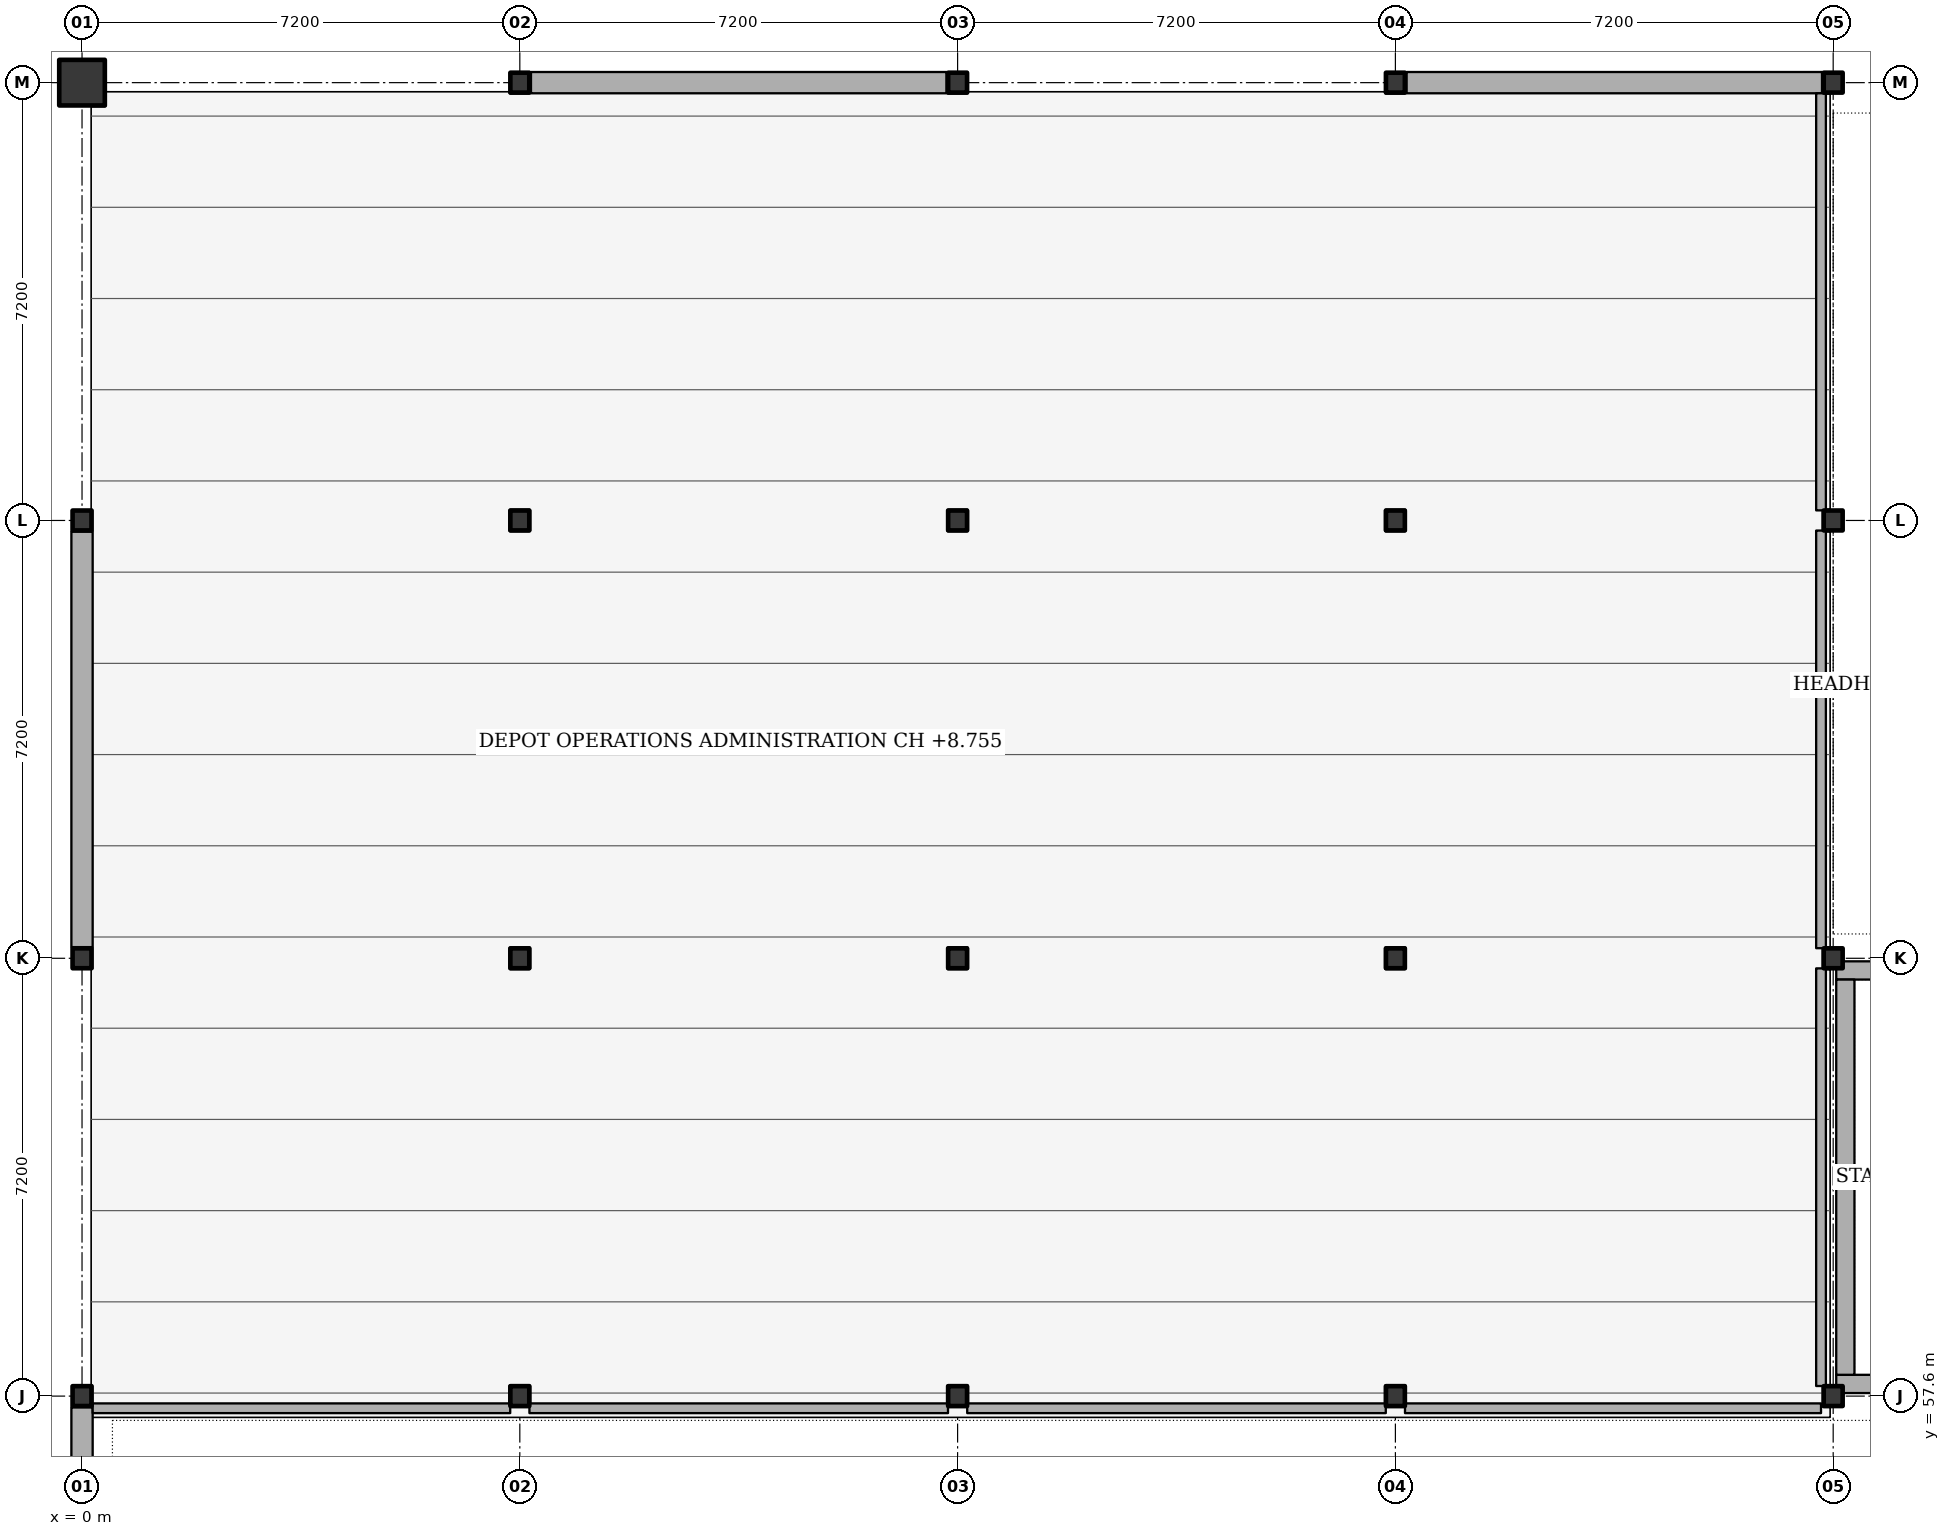
"""IFC4 building model, lengths in metres.
Left out: names, types, materials, properties, quantities, classifications, styles, units other than length and angle.
Written with IfcOpenShell. Run it as: python <this file> out.ifc"""

import sys

from ifc_helpers import new_model, si_unit, direction, frame, frame_2d, origin, origin_2d, place, context, subcontext, project, spatial, rectangle, i_section, extrude, element, fill, save


model = new_model("IFC4")
c1 = context("Model", 3, precision=1e-05, world=origin(), true_north=direction((0.0, 1.0)))
c2 = subcontext(c1, "Body", "Model", "MODEL_VIEW")
j1 = project(units=[si_unit("LENGTHUNIT", "METRE"), si_unit("PLANEANGLEUNIT", "RADIAN")], contexts=[c1])
p1 = place(None, origin())
s1 = spatial("IfcSite", under=j1, at=p1, CompositionType="ELEMENT")
p2 = place(p1, origin())
s2 = spatial("IfcBuilding", under=s1, at=p2, CompositionType="ELEMENT")
p3 = place(p2, frame((0.0, 0.0, 5.4)))
s3 = spatial("IfcBuildingStorey", under=s2, at=p3, CompositionType="ELEMENT", Elevation=5.4)
for number, where, z_axis, x_axis in (
    (1, (0.0, 57.6, 0.0), (0.0, 0.0, 1.0), (1.0, 0.0, 0.0)),
    (2, (0.0, 64.8, 0.0), (0.0, 0.0, 1.0), (1.0, 0.0, 0.0)),
    (3, (0.0, 72.0, 0.0), (0.0, 0.0, 1.0), (1.0, 0.0, 0.0)),
):
    element("IfcColumn", number, at=place(p3, frame(where, z_axis=z_axis, x_axis=x_axis)), inside=s3, PredefinedType="COLUMN", context=c2, shape_type="SweptSolid", body=[
        extrude(i_section(OverallWidth=0.311, OverallDepth=0.327, WebThickness=0.016, FlangeThickness=0.025, FilletRadius=0.015, at=origin_2d()), origin(), (0.0, 0.0, 1.0), 4.5),
    ])
p4 = place(p3, frame((0.0, 79.2, 0.0), z_axis=(0.0, 0.0, 1.0), x_axis=(1.0, 0.0, 0.0)))
e4 = element("IfcColumn", 4, at=p4, inside=s3, PredefinedType="COLUMN", context=c2, shape_type="SweptSolid", body=[
    extrude(rectangle(XDim=0.75, YDim=0.75, at=origin_2d()), origin(), (0.0, 0.0, 1.0), 4.5),
])
for number, where, z_axis, x_axis in (
    (5, (7.2, 57.6, 0.0), (0.0, 0.0, 1.0), (1.0, 0.0, 0.0)),
    (6, (7.2, 64.8, 0.0), (0.0, 0.0, 1.0), (1.0, 0.0, 0.0)),
    (7, (7.2, 72.0, 0.0), (0.0, 0.0, 1.0), (1.0, 0.0, 0.0)),
    (8, (7.2, 79.2, 0.0), (0.0, 0.0, 1.0), (1.0, 0.0, 0.0)),
    (9, (14.4, 57.6, 0.0), (0.0, 0.0, 1.0), (1.0, 0.0, 0.0)),
    (10, (14.4, 64.8, 0.0), (0.0, 0.0, 1.0), (1.0, 0.0, 0.0)),
    (11, (14.4, 72.0, 0.0), (0.0, 0.0, 1.0), (1.0, 0.0, 0.0)),
    (12, (14.4, 79.2, 0.0), (0.0, 0.0, 1.0), (1.0, 0.0, 0.0)),
    (13, (21.6, 57.6, 0.0), (0.0, 0.0, 1.0), (1.0, 0.0, 0.0)),
    (14, (21.6, 64.8, 0.0), (0.0, 0.0, 1.0), (1.0, 0.0, 0.0)),
    (15, (21.6, 72.0, 0.0), (0.0, 0.0, 1.0), (1.0, 0.0, 0.0)),
    (16, (21.6, 79.2, 0.0), (0.0, 0.0, 1.0), (1.0, 0.0, 0.0)),
    (17, (28.8, 57.6, 0.0), (0.0, 0.0, 1.0), (1.0, 0.0, 0.0)),
    (18, (28.8, 64.8, 0.0), (0.0, 0.0, 1.0), (1.0, 0.0, 0.0)),
    (19, (28.8, 72.0, 0.0), (0.0, 0.0, 1.0), (1.0, 0.0, 0.0)),
    (20, (28.8, 79.2, 0.0), (0.0, 0.0, 1.0), (1.0, 0.0, 0.0)),
):
    element("IfcColumn", number, at=place(p3, frame(where, z_axis=z_axis, x_axis=x_axis)), inside=s3, PredefinedType="COLUMN", context=c2, shape_type="SweptSolid", body=[
        extrude(i_section(OverallWidth=0.311, OverallDepth=0.327, WebThickness=0.016, FlangeThickness=0.025, FilletRadius=0.015, at=origin_2d()), origin(), (0.0, 0.0, 1.0), 4.5),
    ])
p5 = place(p3, frame((0.0, 50.583, 0.0), z_axis=(0.0, 0.0, 1.0), x_axis=(0.0, 1.0, 0.0)))
e21 = element("IfcWall", 21, at=p5, inside=s3, PredefinedType="SOLIDWALL", context=c2, shape_type="SweptSolid", body=[
    extrude(rectangle(XDim=6.833, YDim=0.35, at=frame_2d((3.417, 0.0))), origin(), (0.0, 0.0, 1.0), 3.704),
])
p6 = place(p5, frame((0.783, 0.0, 1.05)))
e22 = element("IfcOpeningElement", 22, at=p6, cuts=e21, PredefinedType="OPENING", context=c2, shape_type="SweptSolid", body=[
    extrude(rectangle(XDim=2.4, YDim=1.8, at=frame_2d((1.2, 0.9))), frame((0.0, 0.185, 0.0), z_axis=(0.0, -1.0, 0.0), x_axis=(1.0, 0.0, 0.0)), (0.0, 0.0, 1.0), 0.37),
])
p7 = place(p3, frame((0.0, 64.983, 0.0), z_axis=(0.0, 0.0, 1.0), x_axis=(0.0, 1.0, 0.0)))
e23 = element("IfcWall", 23, at=p7, inside=s3, PredefinedType="SOLIDWALL", context=c2, shape_type="SweptSolid", body=[
    extrude(rectangle(XDim=6.833, YDim=0.35, at=frame_2d((3.417, 0.0))), origin(), (0.0, 0.0, 1.0), 3.704),
])
p8 = place(p7, frame((2.916, 0.0, 1.05)))
e24 = element("IfcOpeningElement", 24, at=p8, cuts=e23, PredefinedType="OPENING", context=c2, shape_type="SweptSolid", body=[
    extrude(rectangle(XDim=1.0, YDim=1.6, at=frame_2d((0.5, 0.8))), frame((0.0, 0.185, 0.0), z_axis=(0.0, -1.0, 0.0), x_axis=(1.0, 0.0, 0.0)), (0.0, 0.0, 1.0), 0.37),
])
p9 = place(p3, frame((7.384, 79.2, 0.0), z_axis=(0.0, 0.0, 1.0), x_axis=(1.0, 0.0, 0.0)))
e25 = element("IfcWall", 25, at=p9, inside=s3, PredefinedType="SOLIDWALL", context=c2, shape_type="SweptSolid", body=[
    extrude(rectangle(XDim=6.833, YDim=0.35, at=frame_2d((3.417, 0.0))), origin(), (0.0, 0.0, 1.0), 3.389),
])
p10 = place(p9, frame((2.916, 0.0, 1.05)))
e26 = element("IfcOpeningElement", 26, at=p10, cuts=e25, PredefinedType="OPENING", context=c2, shape_type="SweptSolid", body=[
    extrude(rectangle(XDim=1.0, YDim=1.6, at=frame_2d((0.5, 0.8))), frame((0.0, 0.185, 0.0), z_axis=(0.0, -1.0, 0.0), x_axis=(1.0, 0.0, 0.0)), (0.0, 0.0, 1.0), 0.37),
])
p11 = place(p3, frame((21.784, 79.2, 0.0), z_axis=(0.0, 0.0, 1.0), x_axis=(1.0, 0.0, 0.0)))
e27 = element("IfcWall", 27, at=p11, inside=s3, PredefinedType="SOLIDWALL", context=c2, shape_type="SweptSolid", body=[
    extrude(rectangle(XDim=6.833, YDim=0.35, at=frame_2d((3.417, 0.0))), origin(), (0.0, 0.0, 1.0), 3.478),
])
p12 = place(p11, frame((2.541, 0.0, 1.05)))
e28 = element("IfcOpeningElement", 28, at=p12, cuts=e27, PredefinedType="OPENING", context=c2, shape_type="SweptSolid", body=[
    extrude(rectangle(XDim=1.75, YDim=1.85, at=frame_2d((0.875, 0.925))), frame((0.0, 0.185, 0.0), z_axis=(0.0, -1.0, 0.0), x_axis=(1.0, 0.0, 0.0)), (0.0, 0.0, 1.0), 0.37),
])
p13 = place(p3, frame((28.85, 57.8, 0.0), z_axis=(0.0, 0.0, 1.0), x_axis=(1.0, 0.0, 0.0)))
e29 = element("IfcWall", 29, at=p13, inside=s3, PredefinedType="SHEAR", context=c2, shape_type="SweptSolid", body=[
    extrude(rectangle(XDim=14.35, YDim=0.3, at=frame_2d((7.175, 0.0))), origin(), (0.0, 0.0, 1.0), 3.55),
])
p14 = place(p13, frame((11.5, 0.0, 0.0)))
e30 = element("IfcOpeningElement", 30, at=p14, cuts=e29, PredefinedType="OPENING", context=c2, shape_type="SweptSolid", body=[
    extrude(rectangle(XDim=1.5, YDim=2.15, at=frame_2d((0.75, 1.075))), frame((0.0, 0.16, 0.0), z_axis=(0.0, -1.0, 0.0), x_axis=(1.0, 0.0, 0.0)), (0.0, 0.0, 1.0), 0.32),
])
p15 = place(p3, frame((28.85, 64.6, 0.0), z_axis=(0.0, 0.0, 1.0), x_axis=(1.0, 0.0, 0.0)))
e31 = element("IfcWall", 31, at=p15, inside=s3, PredefinedType="SHEAR", context=c2, shape_type="SweptSolid", body=[
    extrude(rectangle(XDim=14.35, YDim=0.3, at=frame_2d((7.175, 0.0))), origin(), (0.0, 0.0, 1.0), 3.55),
])
p16 = place(p3, frame((29.0, 57.95, 0.0), z_axis=(0.0, 0.0, 1.0), x_axis=(0.0, 1.0, 0.0)))
e32 = element("IfcWall", 32, at=p16, inside=s3, PredefinedType="SHEAR", context=c2, shape_type="SweptSolid", body=[
    extrude(rectangle(XDim=6.5, YDim=0.3, at=frame_2d((3.25, 0.0))), origin(), (0.0, 0.0, 1.0), 3.55),
])
p17 = place(p3, frame((0.175, 57.4, 0.0), z_axis=(0.0, 0.0, 1.0), x_axis=(1.0, 0.0, 0.0)))
e33 = element("IfcWall", 33, at=p17, inside=s3, PredefinedType="PARTITIONING", context=c2, shape_type="SweptSolid", body=[
    extrude(rectangle(XDim=6.867, YDim=0.16, at=frame_2d((3.434, 0.0))), origin(), (0.0, 0.0, 1.0), 3.55),
])
p18 = place(p3, frame((7.358, 57.4, 0.0), z_axis=(0.0, 0.0, 1.0), x_axis=(1.0, 0.0, 0.0)))
e34 = element("IfcWall", 34, at=p18, inside=s3, PredefinedType="PARTITIONING", context=c2, shape_type="SweptSolid", body=[
    extrude(rectangle(XDim=6.884, YDim=0.16, at=frame_2d((3.442, 0.0))), origin(), (0.0, 0.0, 1.0), 3.55),
])
p19 = place(p18, frame((2.957, 0.0, 0.0)))
e35 = element("IfcOpeningElement", 35, at=p19, cuts=e34, PredefinedType="OPENING", context=c2, shape_type="SweptSolid", body=[
    extrude(rectangle(XDim=0.97, YDim=2.12, at=frame_2d((0.485, 1.06))), frame((0.0, 0.09, 0.0), z_axis=(0.0, -1.0, 0.0), x_axis=(1.0, 0.0, 0.0)), (0.0, 0.0, 1.0), 0.18),
])
p20 = place(p3, frame((14.558, 57.4, 0.0), z_axis=(0.0, 0.0, 1.0), x_axis=(1.0, 0.0, 0.0)))
e36 = element("IfcWall", 36, at=p20, inside=s3, PredefinedType="PARTITIONING", context=c2, shape_type="SweptSolid", body=[
    extrude(rectangle(XDim=6.884, YDim=0.16, at=frame_2d((3.442, 0.0))), origin(), (0.0, 0.0, 1.0), 3.55),
])
p21 = place(p3, frame((21.758, 57.4, 0.0), z_axis=(0.0, 0.0, 1.0), x_axis=(1.0, 0.0, 0.0)))
e37 = element("IfcWall", 37, at=p21, inside=s3, PredefinedType="PARTITIONING", context=c2, shape_type="SweptSolid", body=[
    extrude(rectangle(XDim=6.842, YDim=0.16, at=frame_2d((3.421, 0.0))), origin(), (0.0, 0.0, 1.0), 3.55),
])
for number, where, z_axis, x_axis in (
    (38, (28.6, 57.766, 0.0), (0.0, 0.0, 1.0), (0.0, 1.0, 0.0)),
    (39, (28.6, 64.966, 0.0), (0.0, 0.0, 1.0), (0.0, 1.0, 0.0)),
):
    element("IfcWall", number, at=place(p3, frame(where, z_axis=z_axis, x_axis=x_axis)), inside=s3, PredefinedType="PARTITIONING", context=c2, shape_type="SweptSolid", body=[
        extrude(rectangle(XDim=6.868, YDim=0.16, at=frame_2d((3.434, 0.0))), origin(), (0.0, 0.0, 1.0), 3.55),
    ])
p22 = place(p3, frame((28.6, 72.166, 0.0), z_axis=(0.0, 0.0, 1.0), x_axis=(0.0, 1.0, 0.0)))
e40 = element("IfcWall", 40, at=p22, inside=s3, PredefinedType="PARTITIONING", context=c2, shape_type="SweptSolid", body=[
    extrude(rectangle(XDim=6.859, YDim=0.16, at=frame_2d((3.429, 0.0))), origin(), (0.0, 0.0, 1.0), 3.55),
])
p23 = place(p8, origin())
e41 = element("IfcWindow", 41, at=p23, inside=s3, PartitioningType="SINGLE_PANEL", PredefinedType="WINDOW", context=c2, shape_type="SweptSolid", body=[
    extrude(rectangle(XDim=1.0, YDim=1.6, at=frame_2d((0.5, 0.8))), frame((0.0, 0.03, 0.0), z_axis=(0.0, -1.0, 0.0), x_axis=(1.0, 0.0, 0.0)), (0.0, 0.0, 1.0), 0.06),
])
fill(e24, e41)
p24 = place(p10, origin())
e42 = element("IfcWindow", 42, at=p24, inside=s3, PartitioningType="SINGLE_PANEL", PredefinedType="WINDOW", context=c2, shape_type="SweptSolid", body=[
    extrude(rectangle(XDim=1.0, YDim=1.6, at=frame_2d((0.5, 0.8))), frame((0.0, 0.03, 0.0), z_axis=(0.0, -1.0, 0.0), x_axis=(1.0, 0.0, 0.0)), (0.0, 0.0, 1.0), 0.06),
])
fill(e26, e42)
p25 = place(p12, origin())
e43 = element("IfcWindow", 43, at=p25, inside=s3, PartitioningType="SINGLE_PANEL", PredefinedType="WINDOW", context=c2, shape_type="SweptSolid", body=[
    extrude(rectangle(XDim=1.75, YDim=1.85, at=frame_2d((0.875, 0.925))), frame((0.0, 0.03, 0.0), z_axis=(0.0, -1.0, 0.0), x_axis=(1.0, 0.0, 0.0)), (0.0, 0.0, 1.0), 0.06),
])
fill(e28, e43)
p26 = place(p19, origin())
e44 = element("IfcDoor", 44, at=p26, inside=s3, OperationType="SINGLE_SWING_RIGHT", PredefinedType="DOOR", context=c2, shape_type="SweptSolid", body=[
    extrude(rectangle(XDim=0.97, YDim=2.12, at=frame_2d((0.485, 1.06))), frame((0.0, 0.025, 0.0), z_axis=(0.0, -1.0, 0.0), x_axis=(1.0, 0.0, 0.0)), (0.0, 0.0, 1.0), 0.05),
])
fill(e35, e44)
save(model, sys.argv[1])
